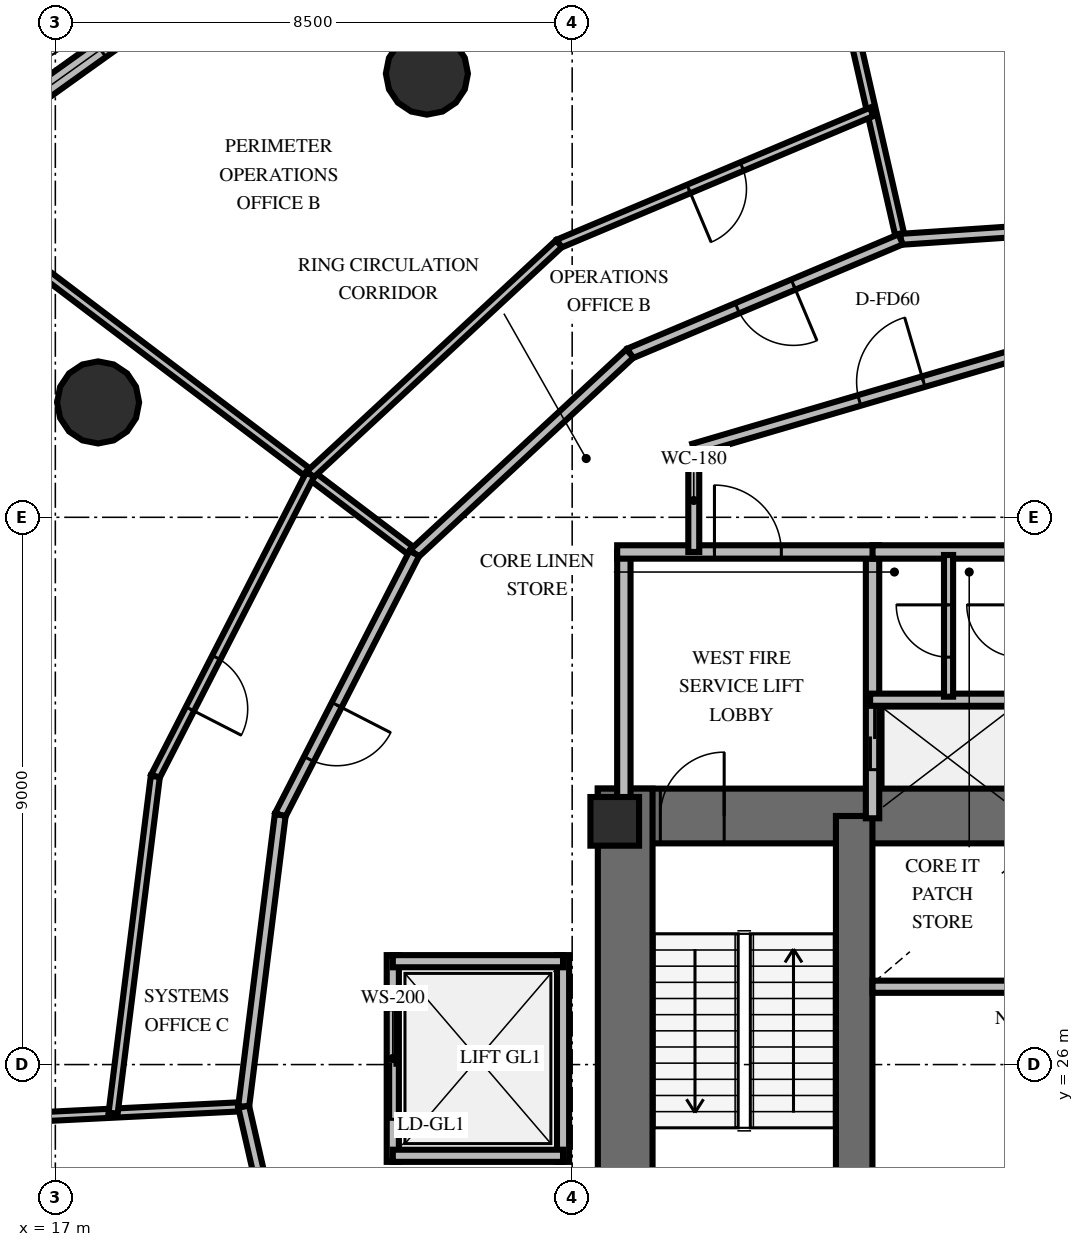
"""IFC4 building model, lengths in metres.
Left out: names, types, materials, properties, quantities, classifications, styles, units other than length and angle.
Written with IfcOpenShell. Run it as: python <this file> out.ifc"""

import sys

from ifc_helpers import new_model, si_unit, direction, frame, frame_2d, origin, origin_2d, place, context, subcontext, project, spatial, rectangle, circle, extrude, element, fill, save


model = new_model("IFC4")
c1 = context("Model", 3, precision=1e-05, world=origin(), true_north=direction((0.0, 1.0)))
c2 = subcontext(c1, "Body", "Model", "MODEL_VIEW")
j1 = project(units=[si_unit("LENGTHUNIT", "METRE"), si_unit("PLANEANGLEUNIT", "RADIAN")], contexts=[c1])
p1 = place(None, origin())
s1 = spatial("IfcSite", under=j1, at=p1, CompositionType="ELEMENT")
p2 = place(p1, origin())
s2 = spatial("IfcBuilding", under=s1, at=p2, CompositionType="ELEMENT")
p3 = place(p2, frame((0.0, 0.0, 42.6)))
s3 = spatial("IfcBuildingStorey", under=s2, at=p3, CompositionType="ELEMENT", Elevation=42.6)
p4 = place(p3, frame((25.922, 30.088, 0.0), z_axis=(0.0, 0.0, 1.0), x_axis=(1.0, 0.0, 0.0)))
e1 = element("IfcWall", 1, at=p4, inside=s3, PredefinedType="SHEAR", context=c2, shape_type="SweptSolid", body=[
    extrude(rectangle(XDim=16.166, YDim=0.9, at=frame_2d((8.083, 0.0))), origin(), (0.0, 0.0, 1.0), 4.2),
])
p5 = place(p4, frame((1.028, 0.0, 0.0)))
e2 = element("IfcOpeningElement", 2, at=p5, cuts=e1, PredefinedType="OPENING", context=c2, shape_type="SweptSolid", body=[
    extrude(rectangle(XDim=1.05, YDim=2.15, at=frame_2d((0.525, 1.075))), frame((0.0, 0.46, 0.0), z_axis=(0.0, -1.0, 0.0), x_axis=(1.0, 0.0, 0.0)), (0.0, 0.0, 1.0), 0.92),
])
p6 = place(p4, frame((14.078, 0.0, 0.0)))
e3 = element("IfcOpeningElement", 3, at=p6, cuts=e1, PredefinedType="OPENING", context=c2, shape_type="SweptSolid", body=[
    extrude(rectangle(XDim=1.05, YDim=2.15, at=frame_2d((0.525, 1.075))), frame((0.0, 0.46, 0.0), z_axis=(0.0, -1.0, 0.0), x_axis=(1.0, 0.0, 0.0)), (0.0, 0.0, 1.0), 0.92),
])
p7 = place(p4, frame((7.528, 0.0, 0.0)))
e4 = element("IfcOpeningElement", 4, at=p7, cuts=e1, PredefinedType="OPENING", context=c2, shape_type="SweptSolid", body=[
    extrude(rectangle(XDim=1.1, YDim=2.15, at=frame_2d((0.55, 1.075))), frame((0.0, 0.46, 0.0), z_axis=(0.0, -1.0, 0.0), x_axis=(1.0, 0.0, 0.0)), (0.0, 0.0, 1.0), 0.92),
])
p8 = place(p3, frame((26.372, 19.662, 0.0), z_axis=(0.0, 0.0, 1.0), x_axis=(0.0, 1.0, 0.0)))
e5 = element("IfcWall", 5, at=p8, inside=s3, PredefinedType="SHEAR", context=c2, shape_type="SweptSolid", body=[
    extrude(rectangle(XDim=10.876, YDim=0.9, at=frame_2d((5.438, 0.0))), origin(), (0.0, 0.0, 1.0), 4.2),
])
p9 = place(p3, frame((30.138, 20.112, 0.0), z_axis=(0.0, 0.0, 1.0), x_axis=(0.0, 1.0, 0.0)))
e6 = element("IfcWall", 6, at=p9, inside=s3, PredefinedType="SHEAR", context=c2, shape_type="SweptSolid", body=[
    extrude(rectangle(XDim=9.976, YDim=0.6, at=frame_2d((4.988, 0.0))), origin(), (0.0, 0.0, 1.0), 4.2),
])
p10 = place(p3, frame((26.2, 30.0, 0.0), z_axis=(0.0, 0.0, 1.0), x_axis=(1.0, 0.0, 0.0)))
e7 = element("IfcColumn", 7, at=p10, inside=s3, PredefinedType="PILASTER", context=c2, shape_type="SweptSolid", body=[
    extrude(rectangle(XDim=0.8, YDim=0.8, at=origin_2d()), origin(), (0.0, 0.0, 1.0), 4.2),
])
for number, where, z_axis, x_axis in (
    (8, (23.111, 42.297, 0.0), (0.0, 0.0, 1.0), (1.0, 0.0, 0.0)),
    (9, (17.703, 36.889, 0.0), (0.0, 0.0, 1.0), (1.0, 0.0, 0.0)),
):
    element("IfcColumn", number, at=place(p3, frame(where, z_axis=z_axis, x_axis=x_axis)), inside=s3, PredefinedType="COLUMN", context=c2, shape_type="SweptSolid", body=[
        extrude(circle(Radius=0.675, at=origin_2d()), origin(), (0.0, 0.0, 1.0), 4.2),
    ])
p11 = place(p3, frame((19.2, 43.732, 0.0), z_axis=(0.0, 0.0, 1.0), x_axis=(-0.813220978615, -0.581955015392, 0.0)))
e10 = element("IfcWall", 10, at=p11, inside=s3, PredefinedType="SOLIDWALL", context=c2, shape_type="SweptSolid", body=[
    extrude(rectangle(XDim=8.793, YDim=0.3, at=frame_2d((4.396, 0.0))), origin(), (0.0, 0.0, 1.0), 3.0),
])
p12 = place(p11, frame((1.79, 0.0, 0.8)))
e11 = element("IfcOpeningElement", 11, at=p12, cuts=e10, PredefinedType="OPENING", context=c2, shape_type="SweptSolid", body=[
    extrude(rectangle(XDim=1.8, YDim=1.95, at=frame_2d((0.9, 0.975))), frame((0.0, 0.16, 0.0), z_axis=(0.0, -1.0, 0.0), x_axis=(1.0, 0.0, 0.0)), (0.0, 0.0, 1.0), 0.32),
])
p13 = place(p3, frame((26.35, 30.05, 0.0), z_axis=(0.0, 0.0, 1.0), x_axis=(0.0, 1.0, 0.0)))
e12 = element("IfcWall", 12, at=p13, inside=s3, PredefinedType="SOLIDWALL", context=c2, shape_type="SweptSolid", body=[
    extrude(rectangle(XDim=4.38, YDim=0.22, at=frame_2d((2.19, 0.0))), origin(), (0.0, 0.0, 1.0), 3.0),
])
p14 = place(p3, frame((30.44, 30.05, 0.0), z_axis=(0.0, 0.0, 1.0), x_axis=(0.0, 1.0, 0.0)))
e13 = element("IfcWall", 13, at=p14, inside=s3, PredefinedType="SOLIDWALL", context=c2, shape_type="SweptSolid", body=[
    extrude(rectangle(XDim=4.38, YDim=0.22, at=frame_2d((2.19, 0.0))), origin(), (0.0, 0.0, 1.0), 3.0),
])
p15 = place(p14, frame((0.8, 0.0, 0.0)))
e14 = element("IfcOpeningElement", 14, at=p15, cuts=e13, PredefinedType="OPENING", context=c2, shape_type="SweptSolid", body=[
    extrude(rectangle(XDim=1.05, YDim=2.1, at=frame_2d((0.525, 1.05))), frame((0.0, 0.12, 0.0), z_axis=(0.0, -1.0, 0.0), x_axis=(1.0, 0.0, 0.0)), (0.0, 0.0, 1.0), 0.24),
])
p16 = place(p3, frame((26.24, 34.43, 0.0), z_axis=(0.0, 0.0, 1.0), x_axis=(1.0, 0.0, 0.0)))
e15 = element("IfcWall", 15, at=p16, inside=s3, PredefinedType="SOLIDWALL", context=c2, shape_type="SweptSolid", body=[
    extrude(rectangle(XDim=4.31, YDim=0.22, at=frame_2d((2.155, 0.0))), origin(), (0.0, 0.0, 1.0), 3.0),
])
p17 = place(p16, frame((1.6, 0.0, 0.0)))
e16 = element("IfcOpeningElement", 16, at=p17, cuts=e15, PredefinedType="OPENING", context=c2, shape_type="SweptSolid", body=[
    extrude(rectangle(XDim=1.1, YDim=2.15, at=frame_2d((0.55, 1.075))), frame((0.0, 0.12, 0.0), z_axis=(0.0, -1.0, 0.0), x_axis=(1.0, 0.0, 0.0)), (0.0, 0.0, 1.0), 0.24),
])
p18 = place(p3, frame((30.4, 32.0, 0.0), z_axis=(0.0, 0.0, 1.0), x_axis=(1.0, 0.0, 0.0)))
e17 = element("IfcWall", 17, at=p18, inside=s3, PredefinedType="SOLIDWALL", context=c2, shape_type="SweptSolid", body=[
    extrude(rectangle(XDim=2.55, YDim=0.2, at=frame_2d((1.275, 0.0))), origin(), (0.0, 0.0, 1.0), 3.0),
])
p19 = place(p3, frame((30.44, 34.43, 0.0), z_axis=(0.0, 0.0, 1.0), x_axis=(1.0, 0.0, 0.0)))
e18 = element("IfcWall", 18, at=p19, inside=s3, PredefinedType="SOLIDWALL", context=c2, shape_type="SweptSolid", body=[
    extrude(rectangle(XDim=7.12, YDim=0.22, at=frame_2d((3.56, 0.0))), origin(), (0.0, 0.0, 1.0), 3.0),
])
p20 = place(p19, frame((3.01, 0.0, 0.0)))
e19 = element("IfcOpeningElement", 19, at=p20, cuts=e18, PredefinedType="OPENING", context=c2, shape_type="SweptSolid", body=[
    extrude(rectangle(XDim=1.1, YDim=2.15, at=frame_2d((0.55, 1.075))), frame((0.0, 0.12, 0.0), z_axis=(0.0, -1.0, 0.0), x_axis=(1.0, 0.0, 0.0)), (0.0, 0.0, 1.0), 0.24),
])
p21 = place(p3, frame((31.69, 32.05, 0.0), z_axis=(0.0, 0.0, 1.0), x_axis=(0.0, 1.0, 0.0)))
e20 = element("IfcWall", 20, at=p21, inside=s3, PredefinedType="PARTITIONING", context=c2, shape_type="SweptSolid", body=[
    extrude(rectangle(XDim=2.33, YDim=0.15, at=frame_2d((1.165, 0.0))), origin(), (0.0, 0.0, 1.0), 3.0),
])
p22 = place(p21, frame((0.65, 0.0, 0.0)))
e21 = element("IfcOpeningElement", 21, at=p22, cuts=e20, PredefinedType="OPENING", context=c2, shape_type="SweptSolid", body=[
    extrude(rectangle(XDim=0.86, YDim=2.05, at=frame_2d((0.43, 1.025))), frame((0.0, 0.085, 0.0), z_axis=(0.0, -1.0, 0.0), x_axis=(1.0, 0.0, 0.0)), (0.0, 0.0, 1.0), 0.17),
])
p23 = place(p3, frame((30.44, 27.28, 0.0), z_axis=(0.0, 0.0, 1.0), x_axis=(1.0, 0.0, 0.0)))
e22 = element("IfcWall", 22, at=p23, inside=s3, PredefinedType="SOLIDWALL", context=c2, shape_type="SweptSolid", body=[
    extrude(rectangle(XDim=2.81, YDim=0.2, at=frame_2d((1.405, 0.0))), origin(), (0.0, 0.0, 1.0), 3.0),
])
p24 = place(p3, frame((22.55, 24.4, 0.0), z_axis=(0.0, 0.0, 1.0), x_axis=(0.0, 1.0, 0.0)))
e23 = element("IfcWall", 23, at=p24, inside=s3, PredefinedType="SOLIDWALL", context=c2, shape_type="SweptSolid", body=[
    extrude(rectangle(XDim=3.4, YDim=0.2, at=frame_2d((1.7, 0.0))), origin(), (0.0, 0.0, 1.0), 3.0),
])
p25 = place(p24, frame((0.7, 0.0, 0.0)))
e24 = element("IfcOpeningElement", 24, at=p25, cuts=e23, PredefinedType="OPENING", context=c2, shape_type="SweptSolid", body=[
    extrude(rectangle(XDim=1.8, YDim=2.4, at=frame_2d((0.9, 1.2))), frame((0.0, 0.11, 0.0), z_axis=(0.0, -1.0, 0.0), x_axis=(1.0, 0.0, 0.0)), (0.0, 0.0, 1.0), 0.22),
])
p26 = place(p3, frame((25.35, 24.4, 0.0), z_axis=(0.0, 0.0, 1.0), x_axis=(0.0, 1.0, 0.0)))
e25 = element("IfcWall", 25, at=p26, inside=s3, PredefinedType="SOLIDWALL", context=c2, shape_type="SweptSolid", body=[
    extrude(rectangle(XDim=3.4, YDim=0.2, at=frame_2d((1.7, 0.0))), origin(), (0.0, 0.0, 1.0), 3.0),
])
for number, where, z_axis, x_axis in (
    (26, (22.55, 24.5, 0.0), (0.0, 0.0, 1.0), (1.0, 0.0, 0.0)),
    (27, (22.55, 27.7, 0.0), (0.0, 0.0, 1.0), (1.0, 0.0, 0.0)),
):
    element("IfcWall", number, at=place(p3, frame(where, z_axis=z_axis, x_axis=x_axis)), inside=s3, PredefinedType="SOLIDWALL", context=c2, shape_type="SweptSolid", body=[
        extrude(rectangle(XDim=2.8, YDim=0.2, at=frame_2d((1.4, 0.0))), origin(), (0.0, 0.0, 1.0), 3.0),
    ])
p27 = place(p3, frame((27.5, 34.43, 0.0), z_axis=(0.0, 0.0, 1.0), x_axis=(0.0, 1.0, 0.0)))
e28 = element("IfcWall", 28, at=p27, inside=s3, PredefinedType="PARTITIONING", context=c2, shape_type="SweptSolid", body=[
    extrude(rectangle(XDim=1.693, YDim=0.18, at=frame_2d((0.846, 0.0))), origin(), (0.0, 0.0, 1.0), 3.0),
])
p28 = place(p3, frame((27.5, 36.123, 0.0), z_axis=(0.0, 0.0, 1.0), x_axis=(0.959546654541, 0.281549671923, 0.0)))
e29 = element("IfcWall", 29, at=p28, inside=s3, PredefinedType="PARTITIONING", context=c2, shape_type="SweptSolid", body=[
    extrude(rectangle(XDim=6.774, YDim=0.18, at=frame_2d((3.387, 0.0))), origin(), (0.0, 0.0, 1.0), 3.0),
])
p29 = place(p28, frame((2.837, 0.0, 0.0)))
e30 = element("IfcOpeningElement", 30, at=p29, cuts=e29, PredefinedType="OPENING", context=c2, shape_type="SweptSolid", body=[
    extrude(rectangle(XDim=1.1, YDim=2.15, at=frame_2d((0.55, 1.075))), frame((0.0, 0.1, 0.0), z_axis=(0.0, -1.0, 0.0), x_axis=(1.0, 0.0, 0.0)), (0.0, 0.0, 1.0), 0.2),
])
p30 = place(p3, frame((30.904, 39.571, 0.0), z_axis=(0.0, 0.0, 1.0), x_axis=(-0.222400432179, 0.974955408091, 0.0)))
e31 = element("IfcWall", 31, at=p30, inside=s3, PredefinedType="PARTITIONING", context=c2, shape_type="SweptSolid", body=[
    extrude(rectangle(XDim=7.514, YDim=0.15, at=frame_2d((3.757, 0.0))), origin(), (0.0, 0.0, 1.0), 3.0),
])
p31 = place(p3, frame((35.25, 39.864, 0.0), z_axis=(0.0, 0.0, 1.0), x_axis=(-0.997742288071, -0.067158965115, 0.0)))
e32 = element("IfcWall", 32, at=p31, inside=s3, PredefinedType="PARTITIONING", context=c2, shape_type="SweptSolid", body=[
    extrude(rectangle(XDim=4.355, YDim=0.18, at=frame_2d((2.177, 0.0))), origin(), (0.0, 0.0, 1.0), 3.0),
])
p32 = place(p31, frame((0.914, 0.0, 0.0)))
e33 = element("IfcOpeningElement", 33, at=p32, cuts=e32, PredefinedType="OPENING", context=c2, shape_type="SweptSolid", body=[
    extrude(rectangle(XDim=1.0, YDim=2.15, at=frame_2d((0.5, 1.075))), frame((0.0, 0.1, 0.0), z_axis=(0.0, -1.0, 0.0), x_axis=(1.0, 0.0, 0.0)), (0.0, 0.0, 1.0), 0.2),
])
p33 = place(p3, frame((22.905, 34.406, 0.0), z_axis=(0.0, 0.0, 1.0), x_axis=(-0.79706649603, 0.603891547305, 0.0)))
e34 = element("IfcWall", 34, at=p33, inside=s3, PredefinedType="PARTITIONING", context=c2, shape_type="SweptSolid", body=[
    extrude(rectangle(XDim=10.551, YDim=0.15, at=frame_2d((5.275, 0.0))), origin(), (0.0, 0.0, 1.0), 3.0),
])
p34 = place(p3, frame((30.904, 39.571, 0.0), z_axis=(0.0, 0.0, 1.0), x_axis=(-0.921533629475, -0.388298557488, 0.0)))
e35 = element("IfcWall", 35, at=p34, inside=s3, PredefinedType="PARTITIONING", context=c2, shape_type="SweptSolid", body=[
    extrude(rectangle(XDim=4.834, YDim=0.18, at=frame_2d((2.417, 0.0))), origin(), (0.0, 0.0, 1.0), 3.0),
])
p35 = place(p34, frame((1.917, 0.0, 0.0)))
e36 = element("IfcOpeningElement", 36, at=p35, cuts=e35, PredefinedType="OPENING", context=c2, shape_type="SweptSolid", body=[
    extrude(rectangle(XDim=1.0, YDim=2.15, at=frame_2d((0.5, 1.075))), frame((0.0, 0.1, 0.0), z_axis=(0.0, -1.0, 0.0), x_axis=(1.0, 0.0, 0.0)), (0.0, 0.0, 1.0), 0.2),
])
p36 = place(p3, frame((26.449, 37.694, 0.0), z_axis=(0.0, 0.0, 1.0), x_axis=(-0.733122561519, -0.680096544464, 0.0)))
e37 = element("IfcWall", 37, at=p36, inside=s3, PredefinedType="PARTITIONING", context=c2, shape_type="SweptSolid", body=[
    extrude(rectangle(XDim=4.834, YDim=0.18, at=frame_2d((2.417, 0.0))), origin(), (0.0, 0.0, 1.0), 3.0),
])
p37 = place(p3, frame((30.426, 41.667, 0.0), z_axis=(0.0, 0.0, 1.0), x_axis=(-0.921524174523, -0.388320995787, 0.0)))
e38 = element("IfcWall", 38, at=p37, inside=s3, PredefinedType="PARTITIONING", context=c2, shape_type="SweptSolid", body=[
    extrude(rectangle(XDim=5.581, YDim=0.15, at=frame_2d((2.791, 0.0))), origin(), (0.0, 0.0, 1.0), 3.0),
])
p38 = place(p37, frame((2.315, 0.0, 0.0)))
e39 = element("IfcOpeningElement", 39, at=p38, cuts=e38, PredefinedType="OPENING", context=c2, shape_type="SweptSolid", body=[
    extrude(rectangle(XDim=0.95, YDim=2.15, at=frame_2d((0.475, 1.075))), frame((0.0, 0.085, 0.0), z_axis=(0.0, -1.0, 0.0), x_axis=(1.0, 0.0, 0.0)), (0.0, 0.0, 1.0), 0.17),
])
p39 = place(p3, frame((25.283, 39.5, 0.0), z_axis=(0.0, 0.0, 1.0), x_axis=(-0.733119036789, -0.680100343992, 0.0)))
e40 = element("IfcWall", 40, at=p39, inside=s3, PredefinedType="PARTITIONING", context=c2, shape_type="SweptSolid", body=[
    extrude(rectangle(XDim=5.581, YDim=0.15, at=frame_2d((2.791, 0.0))), origin(), (0.0, 0.0, 1.0), 3.0),
])
p40 = place(p3, frame((20.097, 25.308, 0.0), z_axis=(0.0, 0.0, 1.0), x_axis=(-0.99876293138, -0.049725314484, 0.0)))
e41 = element("IfcWall", 41, at=p40, inside=s3, PredefinedType="PARTITIONING", context=c2, shape_type="SweptSolid", body=[
    extrude(rectangle(XDim=13.88, YDim=0.15, at=frame_2d((6.94, 0.0))), origin(), (0.0, 0.0, 1.0), 3.0),
])
p41 = place(p3, frame((22.905, 34.406, 0.0), z_axis=(0.0, 0.0, 1.0), x_axis=(-0.45634125461, -0.889804843402, 0.0)))
e42 = element("IfcWall", 42, at=p41, inside=s3, PredefinedType="PARTITIONING", context=c2, shape_type="SweptSolid", body=[
    extrude(rectangle(XDim=4.834, YDim=0.18, at=frame_2d((2.417, 0.0))), origin(), (0.0, 0.0, 1.0), 3.0),
])
p42 = place(p41, frame((2.801, 0.0, 0.0)))
e43 = element("IfcOpeningElement", 43, at=p42, cuts=e42, PredefinedType="OPENING", context=c2, shape_type="SweptSolid", body=[
    extrude(rectangle(XDim=1.0, YDim=2.15, at=frame_2d((0.5, 1.075))), frame((0.0, 0.1, 0.0), z_axis=(0.0, -1.0, 0.0), x_axis=(1.0, 0.0, 0.0)), (0.0, 0.0, 1.0), 0.2),
])
p43 = place(p3, frame((20.699, 30.105, 0.0), z_axis=(0.0, 0.0, 1.0), x_axis=(-0.124482228692, -0.992221837464, 0.0)))
e44 = element("IfcWall", 44, at=p43, inside=s3, PredefinedType="PARTITIONING", context=c2, shape_type="SweptSolid", body=[
    extrude(rectangle(XDim=4.834, YDim=0.18, at=frame_2d((2.417, 0.0))), origin(), (0.0, 0.0, 1.0), 3.0),
])
p44 = place(p3, frame((21.191, 35.705, 0.0), z_axis=(0.0, 0.0, 1.0), x_axis=(-0.456341514091, -0.889804710326, 0.0)))
e45 = element("IfcWall", 45, at=p44, inside=s3, PredefinedType="PARTITIONING", context=c2, shape_type="SweptSolid", body=[
    extrude(rectangle(XDim=5.581, YDim=0.15, at=frame_2d((2.791, 0.0))), origin(), (0.0, 0.0, 1.0), 3.0),
])
p45 = place(p44, frame((3.383, 0.0, 0.0)))
e46 = element("IfcOpeningElement", 46, at=p45, cuts=e45, PredefinedType="OPENING", context=c2, shape_type="SweptSolid", body=[
    extrude(rectangle(XDim=0.95, YDim=2.15, at=frame_2d((0.475, 1.075))), frame((0.0, 0.085, 0.0), z_axis=(0.0, -1.0, 0.0), x_axis=(1.0, 0.0, 0.0)), (0.0, 0.0, 1.0), 0.17),
])
p46 = place(p3, frame((18.645, 30.739, 0.0), z_axis=(0.0, 0.0, 1.0), x_axis=(-0.12445467599, -0.992225293784, 0.0)))
e47 = element("IfcWall", 47, at=p46, inside=s3, PredefinedType="PARTITIONING", context=c2, shape_type="SweptSolid", body=[
    extrude(rectangle(XDim=5.581, YDim=0.15, at=frame_2d((2.791, 0.0))), origin(), (0.0, 0.0, 1.0), 3.0),
])
p47 = place(p3, frame((20.097, 25.308, 0.0), z_axis=(0.0, 0.0, 1.0), x_axis=(0.222402444604, -0.974954949028, 0.0)))
e48 = element("IfcWall", 48, at=p47, inside=s3, PredefinedType="PARTITIONING", context=c2, shape_type="SweptSolid", body=[
    extrude(rectangle(XDim=4.834, YDim=0.18, at=frame_2d((2.417, 0.0))), origin(), (0.0, 0.0, 1.0), 3.0),
])
p48 = place(p47, frame((2.801, 0.0, 0.0)))
e49 = element("IfcOpeningElement", 49, at=p48, cuts=e48, PredefinedType="OPENING", context=c2, shape_type="SweptSolid", body=[
    extrude(rectangle(XDim=1.0, YDim=2.15, at=frame_2d((0.5, 1.075))), frame((0.0, 0.1, 0.0), z_axis=(0.0, -1.0, 0.0), x_axis=(1.0, 0.0, 0.0)), (0.0, 0.0, 1.0), 0.2),
])
p49 = place(p12, origin())
e50 = element("IfcWindow", 50, at=p49, inside=s3, PartitioningType="SINGLE_PANEL", PredefinedType="WINDOW", context=c2, shape_type="SweptSolid", body=[
    extrude(rectangle(XDim=1.8, YDim=1.95, at=frame_2d((0.9, 0.975))), frame((0.0, 0.03, 0.0), z_axis=(0.0, -1.0, 0.0), x_axis=(1.0, 0.0, 0.0)), (0.0, 0.0, 1.0), 0.06),
])
fill(e11, e50)
p50 = place(p5, origin())
e51 = element("IfcDoor", 51, at=p50, inside=s3, OperationType="SINGLE_SWING_RIGHT", PredefinedType="DOOR", context=c2, shape_type="SweptSolid", body=[
    extrude(rectangle(XDim=1.05, YDim=2.15, at=frame_2d((0.525, 1.075))), frame((0.0, 0.025, 0.0), z_axis=(0.0, -1.0, 0.0), x_axis=(1.0, 0.0, 0.0)), (0.0, 0.0, 1.0), 0.05),
])
fill(e2, e51)
p51 = place(p17, origin())
e52 = element("IfcDoor", 52, at=p51, inside=s3, OperationType="SINGLE_SWING_LEFT", PredefinedType="DOOR", context=c2, shape_type="SweptSolid", body=[
    extrude(rectangle(XDim=1.1, YDim=2.15, at=frame_2d((0.55, 1.075))), frame((0.0, 0.025, 0.0), z_axis=(0.0, -1.0, 0.0), x_axis=(1.0, 0.0, 0.0)), (0.0, 0.0, 1.0), 0.05),
])
fill(e16, e52)
p52 = place(p15, origin())
e53 = element("IfcDoor", 53, at=p52, inside=s3, OperationType="DOUBLE_DOOR_SLIDING", PredefinedType="USERDEFINED", context=c2, shape_type="SweptSolid", body=[
    extrude(rectangle(XDim=1.05, YDim=2.1, at=frame_2d((0.525, 1.05))), frame((0.0, 0.025, 0.0), z_axis=(0.0, -1.0, 0.0), x_axis=(1.0, 0.0, 0.0)), (0.0, 0.0, 1.0), 0.05),
])
fill(e14, e53)
p53 = place(p22, origin())
e54 = element("IfcDoor", 54, at=p53, inside=s3, OperationType="SINGLE_SWING_RIGHT", PredefinedType="TRAPDOOR", context=c2, shape_type="SweptSolid", body=[
    extrude(rectangle(XDim=0.86, YDim=2.05, at=frame_2d((0.43, 1.025))), frame((0.0, 0.025, 0.0), z_axis=(0.0, -1.0, 0.0), x_axis=(1.0, 0.0, 0.0)), (0.0, 0.0, 1.0), 0.05),
])
fill(e21, e54)
p54 = place(p25, origin())
e55 = element("IfcDoor", 55, at=p54, inside=s3, OperationType="DOUBLE_DOOR_SLIDING", PredefinedType="USERDEFINED", context=c2, shape_type="SweptSolid", body=[
    extrude(rectangle(XDim=1.8, YDim=2.4, at=frame_2d((0.9, 1.2))), frame((0.0, 0.025, 0.0), z_axis=(0.0, -1.0, 0.0), x_axis=(1.0, 0.0, 0.0)), (0.0, 0.0, 1.0), 0.05),
])
fill(e24, e55)
p55 = place(p29, origin())
e56 = element("IfcDoor", 56, at=p55, inside=s3, OperationType="SINGLE_SWING_RIGHT", PredefinedType="DOOR", context=c2, shape_type="SweptSolid", body=[
    extrude(rectangle(XDim=1.1, YDim=2.15, at=frame_2d((0.55, 1.075))), frame((0.0, 0.025, 0.0), z_axis=(0.0, -1.0, 0.0), x_axis=(1.0, 0.0, 0.0)), (0.0, 0.0, 1.0), 0.05),
])
fill(e30, e56)
p56 = place(p35, origin())
e57 = element("IfcDoor", 57, at=p56, inside=s3, OperationType="SINGLE_SWING_LEFT", PredefinedType="DOOR", context=c2, shape_type="SweptSolid", body=[
    extrude(rectangle(XDim=1.0, YDim=2.15, at=frame_2d((0.5, 1.075))), frame((0.0, 0.025, 0.0), z_axis=(0.0, -1.0, 0.0), x_axis=(1.0, 0.0, 0.0)), (0.0, 0.0, 1.0), 0.05),
])
fill(e36, e57)
p57 = place(p38, origin())
e58 = element("IfcDoor", 58, at=p57, inside=s3, OperationType="SINGLE_SWING_RIGHT", PredefinedType="DOOR", context=c2, shape_type="SweptSolid", body=[
    extrude(rectangle(XDim=0.95, YDim=2.15, at=frame_2d((0.475, 1.075))), frame((0.0, 0.025, 0.0), z_axis=(0.0, -1.0, 0.0), x_axis=(1.0, 0.0, 0.0)), (0.0, 0.0, 1.0), 0.05),
])
fill(e39, e58)
p58 = place(p42, origin())
e59 = element("IfcDoor", 59, at=p58, inside=s3, OperationType="SINGLE_SWING_LEFT", PredefinedType="DOOR", context=c2, shape_type="SweptSolid", body=[
    extrude(rectangle(XDim=1.0, YDim=2.15, at=frame_2d((0.5, 1.075))), frame((0.0, 0.025, 0.0), z_axis=(0.0, -1.0, 0.0), x_axis=(1.0, 0.0, 0.0)), (0.0, 0.0, 1.0), 0.05),
])
fill(e43, e59)
p59 = place(p45, origin())
e60 = element("IfcDoor", 60, at=p59, inside=s3, OperationType="SINGLE_SWING_RIGHT", PredefinedType="DOOR", context=c2, shape_type="SweptSolid", body=[
    extrude(rectangle(XDim=0.95, YDim=2.15, at=frame_2d((0.475, 1.075))), frame((0.0, 0.025, 0.0), z_axis=(0.0, -1.0, 0.0), x_axis=(1.0, 0.0, 0.0)), (0.0, 0.0, 1.0), 0.05),
])
fill(e46, e60)
save(model, sys.argv[1])
